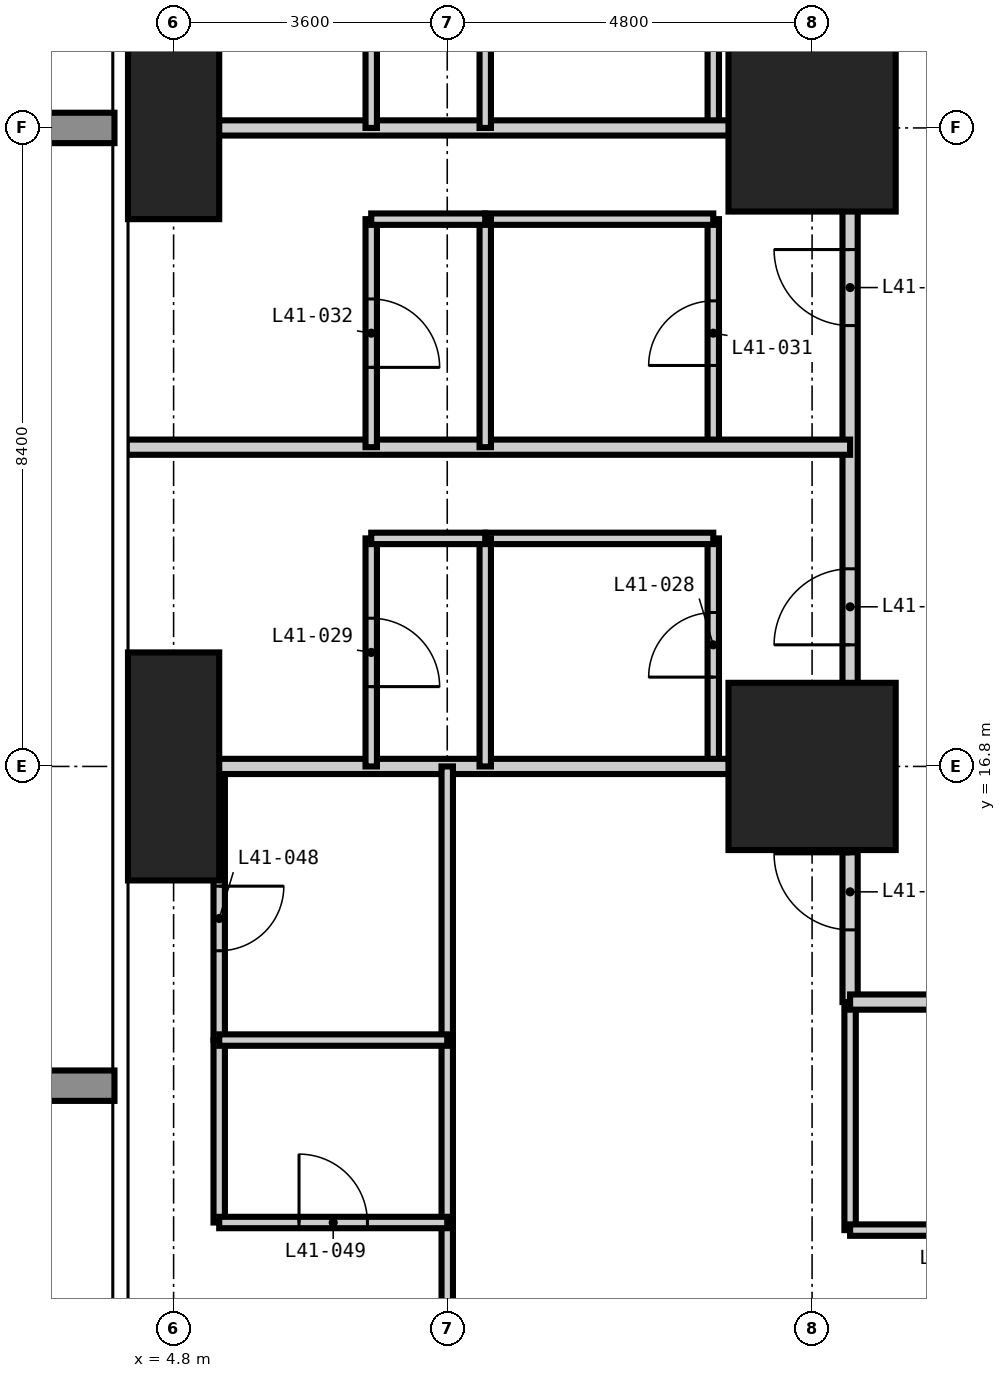
"""IFC4 building model, lengths in metres.
Left out: names, types, materials, properties, quantities, classifications, styles, units other than length and angle.
Written with IfcOpenShell. Run it as: python <this file> out.ifc"""

import sys

from ifc_helpers import new_model, si_unit, direction, frame, frame_2d, origin, origin_2d, place, context, subcontext, project, spatial, rectangle, extrude, element, fill, save


model = new_model("IFC4")
c1 = context("Model", 3, precision=1e-05, world=origin(), true_north=direction((0.0, 1.0)))
c2 = subcontext(c1, "Body", "Model", "MODEL_VIEW")
j1 = project(units=[si_unit("LENGTHUNIT", "METRE"), si_unit("PLANEANGLEUNIT", "RADIAN")], contexts=[c1])
p1 = place(None, origin())
s1 = spatial("IfcSite", under=j1, at=p1, CompositionType="ELEMENT")
p2 = place(p1, origin())
s2 = spatial("IfcBuilding", under=s1, at=p2, CompositionType="ELEMENT")
p3 = place(p2, frame((0.0, 0.0, 162.6)))
s3 = spatial("IfcBuildingStorey", under=s2, at=p3, CompositionType="ELEMENT", Elevation=162.6)
p4 = place(p3, frame((4.8, 16.8, -0.35), z_axis=(0.0, 0.0, 1.0), x_axis=(1.0, 0.0, 0.0)))
e1 = element("IfcColumn", 1, at=p4, inside=s3, PredefinedType="COLUMN", context=c2, shape_type="SweptSolid", body=[
    extrude(rectangle(XDim=1.2, YDim=3.0, at=origin_2d()), origin(), (0.0, 0.0, 1.0), 3.6),
])
p5 = place(p3, frame((4.8, 25.2, -0.35), z_axis=(0.0, 0.0, 1.0), x_axis=(1.0, 0.0, 0.0)))
e2 = element("IfcColumn", 2, at=p5, inside=s3, PredefinedType="COLUMN", context=c2, shape_type="SweptSolid", body=[
    extrude(rectangle(XDim=1.2, YDim=2.4, at=origin_2d()), origin(), (0.0, 0.0, 1.0), 3.6),
])
for number, where, z_axis, x_axis in (
    (3, (13.2, 16.8, -0.35), (0.0, 0.0, 1.0), (1.0, 0.0, 0.0)),
    (4, (13.2, 25.2, -0.35), (0.0, 0.0, 1.0), (1.0, 0.0, 0.0)),
):
    element("IfcColumn", number, at=place(p3, frame(where, z_axis=z_axis, x_axis=x_axis)), inside=s3, PredefinedType="COLUMN", context=c2, shape_type="SweptSolid", body=[
        extrude(rectangle(XDim=2.2, YDim=2.2, at=origin_2d()), origin(), (0.0, 0.0, 1.0), 3.6),
    ])
p6 = place(p3, frame((5.4, 13.2, 0.0), z_axis=(0.0, 0.0, 1.0), x_axis=(0.0, 1.0, 0.0)))
e5 = element("IfcWall", 5, at=p6, inside=s3, PredefinedType="PARTITIONING", context=c2, shape_type="SweptSolid", body=[
    extrude(rectangle(XDim=3.6, YDim=0.15, at=frame_2d((1.8, 0.0))), origin(), (0.0, 0.0, 1.0), 3.25),
])
p7 = place(p6, frame((1.175, 0.0, 0.0)))
e6 = element("IfcOpeningElement", 6, at=p7, cuts=e5, PredefinedType="OPENING", context=c2, shape_type="SweptSolid", body=[
    extrude(rectangle(XDim=0.85, YDim=2.1, at=frame_2d((0.425, 1.05))), frame((0.0, 0.085, 0.0), z_axis=(0.0, -1.0, 0.0), x_axis=(1.0, 0.0, 0.0)), (0.0, 0.0, 1.0), 0.17),
])
p8 = place(p3, frame((11.9, 16.8, 0.0), z_axis=(0.0, 0.0, 1.0), x_axis=(0.0, 1.0, 0.0)))
e7 = element("IfcWall", 7, at=p8, inside=s3, PredefinedType="PARTITIONING", context=c2, shape_type="SweptSolid", body=[
    extrude(rectangle(XDim=3.0, YDim=0.15, at=frame_2d((1.5, 0.0))), origin(), (0.0, 0.0, 1.0), 3.25),
])
p9 = place(p8, frame((1.175, 0.0, 0.0)))
e8 = element("IfcOpeningElement", 8, at=p9, cuts=e7, PredefinedType="OPENING", context=c2, shape_type="SweptSolid", body=[
    extrude(rectangle(XDim=0.85, YDim=2.1, at=frame_2d((0.425, 1.05))), frame((0.0, 0.085, 0.0), z_axis=(0.0, -1.0, 0.0), x_axis=(1.0, 0.0, 0.0)), (0.0, 0.0, 1.0), 0.17),
])
p10 = place(p3, frame((11.9, 21.0, 0.0), z_axis=(0.0, 0.0, 1.0), x_axis=(0.0, 1.0, 0.0)))
e9 = element("IfcWall", 9, at=p10, inside=s3, PredefinedType="PARTITIONING", context=c2, shape_type="SweptSolid", body=[
    extrude(rectangle(XDim=3.0, YDim=0.15, at=frame_2d((1.5, 0.0))), origin(), (0.0, 0.0, 1.0), 3.25),
])
p11 = place(p10, frame((1.075, 0.0, 0.0)))
e10 = element("IfcOpeningElement", 10, at=p11, cuts=e9, PredefinedType="OPENING", context=c2, shape_type="SweptSolid", body=[
    extrude(rectangle(XDim=0.85, YDim=2.1, at=frame_2d((0.425, 1.05))), frame((0.0, 0.085, 0.0), z_axis=(0.0, -1.0, 0.0), x_axis=(1.0, 0.0, 0.0)), (0.0, 0.0, 1.0), 0.17),
])
p12 = place(p3, frame((11.9, 25.2, 0.0), z_axis=(0.0, 0.0, 1.0), x_axis=(0.0, 1.0, 0.0)))
e11 = element("IfcWall", 11, at=p12, inside=s3, PredefinedType="PARTITIONING", context=c2, shape_type="SweptSolid", body=[
    extrude(rectangle(XDim=3.0, YDim=0.15, at=frame_2d((1.5, 0.0))), origin(), (0.0, 0.0, 1.0), 3.25),
])
p13 = place(p12, frame((1.175, 0.0, 0.0)))
e12 = element("IfcOpeningElement", 12, at=p13, cuts=e11, PredefinedType="OPENING", context=c2, shape_type="SweptSolid", body=[
    extrude(rectangle(XDim=0.85, YDim=2.1, at=frame_2d((0.425, 1.05))), frame((0.0, 0.085, 0.0), z_axis=(0.0, -1.0, 0.0), x_axis=(1.0, 0.0, 0.0)), (0.0, 0.0, 1.0), 0.17),
])
p14 = place(p3, frame((13.7, 10.7, 0.0), z_axis=(0.0, 0.0, 1.0), x_axis=(0.0, 1.0, 0.0)))
e13 = element("IfcWall", 13, at=p14, inside=s3, PredefinedType="PARTITIONING", context=c2, shape_type="SweptSolid", body=[
    extrude(rectangle(XDim=3.0, YDim=0.15, at=frame_2d((1.5, 0.0))), origin(), (0.0, 0.0, 1.0), 3.25),
])
p15 = place(p3, frame((13.7, 10.7, 0.0), z_axis=(0.0, 0.0, 1.0), x_axis=(1.0, 0.0, 0.0)))
e14 = element("IfcWall", 14, at=p15, inside=s3, PredefinedType="PARTITIONING", context=c2, shape_type="SweptSolid", body=[
    extrude(rectangle(XDim=3.1, YDim=0.15, at=frame_2d((1.55, 0.0))), origin(), (0.0, 0.0, 1.0), 3.25),
])
p16 = place(p15, frame((1.125, 0.0, 0.0)))
e15 = element("IfcOpeningElement", 15, at=p16, cuts=e14, PredefinedType="OPENING", context=c2, shape_type="SweptSolid", body=[
    extrude(rectangle(XDim=0.85, YDim=2.1, at=frame_2d((0.425, 1.05))), frame((0.0, 0.085, 0.0), z_axis=(0.0, -1.0, 0.0), x_axis=(1.0, 0.0, 0.0)), (0.0, 0.0, 1.0), 0.17),
])
for number, where, z_axis, x_axis in (
    (16, (8.9, 19.8, 0.0), (0.0, 0.0, 1.0), (1.0, 0.0, 0.0)),
    (17, (8.9, 24.0, 0.0), (0.0, 0.0, 1.0), (1.0, 0.0, 0.0)),
):
    element("IfcWall", number, at=place(p3, frame(where, z_axis=z_axis, x_axis=x_axis)), inside=s3, PredefinedType="PARTITIONING", context=c2, shape_type="SweptSolid", body=[
        extrude(rectangle(XDim=3.0, YDim=0.15, at=frame_2d((1.5, 0.0))), origin(), (0.0, 0.0, 1.0), 3.25),
    ])
p17 = place(p3, frame((13.7, 13.7, 0.0), z_axis=(0.0, 0.0, 1.0), x_axis=(0.0, 1.0, 0.0)))
e18 = element("IfcWall", 18, at=p17, inside=s3, PredefinedType="PARTITIONING", context=c2, shape_type="SweptSolid", body=[
    extrude(rectangle(XDim=30.8, YDim=0.2, at=frame_2d((15.4, 0.0))), origin(), (0.0, 0.0, 1.0), 3.25),
])
p18 = place(p17, frame((4.7, 0.0, 0.0)))
e19 = element("IfcOpeningElement", 19, at=p18, cuts=e18, PredefinedType="OPENING", context=c2, shape_type="SweptSolid", body=[
    extrude(rectangle(XDim=1.0, YDim=2.2, at=frame_2d((0.5, 1.1))), frame((0.0, 0.11, 0.0), z_axis=(0.0, -1.0, 0.0), x_axis=(1.0, 0.0, 0.0)), (0.0, 0.0, 1.0), 0.22),
])
p19 = place(p17, frame((8.9, 0.0, 0.0)))
e20 = element("IfcOpeningElement", 20, at=p19, cuts=e18, PredefinedType="OPENING", context=c2, shape_type="SweptSolid", body=[
    extrude(rectangle(XDim=1.0, YDim=2.2, at=frame_2d((0.5, 1.1))), frame((0.0, 0.11, 0.0), z_axis=(0.0, -1.0, 0.0), x_axis=(1.0, 0.0, 0.0)), (0.0, 0.0, 1.0), 0.22),
])
p20 = place(p17, frame((13.1, 0.0, 0.0)))
e21 = element("IfcOpeningElement", 21, at=p20, cuts=e18, PredefinedType="OPENING", context=c2, shape_type="SweptSolid", body=[
    extrude(rectangle(XDim=1.0, YDim=2.2, at=frame_2d((0.5, 1.1))), frame((0.0, 0.11, 0.0), z_axis=(0.0, -1.0, 0.0), x_axis=(1.0, 0.0, 0.0)), (0.0, 0.0, 1.0), 0.22),
])
p21 = place(p17, frame((17.3, 0.0, 0.0)))
e22 = element("IfcOpeningElement", 22, at=p21, cuts=e18, PredefinedType="OPENING", context=c2, shape_type="SweptSolid", body=[
    extrude(rectangle(XDim=1.0, YDim=2.2, at=frame_2d((0.5, 1.1))), frame((0.0, 0.11, 0.0), z_axis=(0.0, -1.0, 0.0), x_axis=(1.0, 0.0, 0.0)), (0.0, 0.0, 1.0), 0.22),
])
p22 = place(p17, frame((21.5, 0.0, 0.0)))
e23 = element("IfcOpeningElement", 23, at=p22, cuts=e18, PredefinedType="OPENING", context=c2, shape_type="SweptSolid", body=[
    extrude(rectangle(XDim=1.0, YDim=2.2, at=frame_2d((0.5, 1.1))), frame((0.0, 0.11, 0.0), z_axis=(0.0, -1.0, 0.0), x_axis=(1.0, 0.0, 0.0)), (0.0, 0.0, 1.0), 0.22),
])
p23 = place(p17, frame((25.7, 0.0, 0.0)))
e24 = element("IfcOpeningElement", 24, at=p23, cuts=e18, PredefinedType="OPENING", context=c2, shape_type="SweptSolid", body=[
    extrude(rectangle(XDim=1.0, YDim=2.2, at=frame_2d((0.5, 1.1))), frame((0.0, 0.11, 0.0), z_axis=(0.0, -1.0, 0.0), x_axis=(1.0, 0.0, 0.0)), (0.0, 0.0, 1.0), 0.22),
])
p24 = place(p17, frame((0.95, 0.0, 0.0)))
e25 = element("IfcOpeningElement", 25, at=p24, cuts=e18, PredefinedType="OPENING", context=c2, shape_type="SweptSolid", body=[
    extrude(rectangle(XDim=1.0, YDim=2.2, at=frame_2d((0.5, 1.1))), frame((0.0, 0.11, 0.0), z_axis=(0.0, -1.0, 0.0), x_axis=(1.0, 0.0, 0.0)), (0.0, 0.0, 1.0), 0.22),
])
p25 = place(p17, frame((29.45, 0.0, 0.0)))
e26 = element("IfcOpeningElement", 26, at=p25, cuts=e18, PredefinedType="OPENING", context=c2, shape_type="SweptSolid", body=[
    extrude(rectangle(XDim=1.0, YDim=2.2, at=frame_2d((0.5, 1.1))), frame((0.0, 0.11, 0.0), z_axis=(0.0, -1.0, 0.0), x_axis=(1.0, 0.0, 0.0)), (0.0, 0.0, 1.0), 0.22),
])
p26 = place(p3, frame((45.7, 13.7, 0.0), z_axis=(0.0, 0.0, 1.0), x_axis=(-1.0, 0.0, 0.0)))
e27 = element("IfcWall", 27, at=p26, inside=s3, PredefinedType="PARTITIONING", context=c2, shape_type="SweptSolid", body=[
    extrude(rectangle(XDim=32.0, YDim=0.2, at=frame_2d((16.0, 0.0))), origin(), (0.0, 0.0, 1.0), 3.25),
])
p27 = place(p26, frame((24.2, 0.0, 0.0)))
e28 = element("IfcOpeningElement", 28, at=p27, cuts=e27, PredefinedType="OPENING", context=c2, shape_type="SweptSolid", body=[
    extrude(rectangle(XDim=1.0, YDim=2.2, at=frame_2d((0.5, 1.1))), frame((0.0, 0.11, 0.0), z_axis=(0.0, -1.0, 0.0), x_axis=(1.0, 0.0, 0.0)), (0.0, 0.0, 1.0), 0.22),
])
p28 = place(p26, frame((15.8, 0.0, 0.0)))
e29 = element("IfcOpeningElement", 29, at=p28, cuts=e27, PredefinedType="OPENING", context=c2, shape_type="SweptSolid", body=[
    extrude(rectangle(XDim=1.0, YDim=2.2, at=frame_2d((0.5, 1.1))), frame((0.0, 0.11, 0.0), z_axis=(0.0, -1.0, 0.0), x_axis=(1.0, 0.0, 0.0)), (0.0, 0.0, 1.0), 0.22),
])
p29 = place(p26, frame((7.4, 0.0, 0.0)))
e30 = element("IfcOpeningElement", 30, at=p29, cuts=e27, PredefinedType="OPENING", context=c2, shape_type="SweptSolid", body=[
    extrude(rectangle(XDim=1.0, YDim=2.2, at=frame_2d((0.5, 1.1))), frame((0.0, 0.11, 0.0), z_axis=(0.0, -1.0, 0.0), x_axis=(1.0, 0.0, 0.0)), (0.0, 0.0, 1.0), 0.22),
])
for number, where, z_axis, x_axis in (
    (31, (4.182, 16.8, 0.0), (0.0, 0.0, 1.0), (1.0, 0.0, 0.0)),
    (32, (4.182, 21.0, 0.0), (0.0, 0.0, 1.0), (1.0, 0.0, 0.0)),
    (33, (4.182, 25.2, 0.0), (0.0, 0.0, 1.0), (1.0, 0.0, 0.0)),
):
    element("IfcWall", number, at=place(p3, frame(where, z_axis=z_axis, x_axis=x_axis)), inside=s3, PredefinedType="PARTITIONING", context=c2, shape_type="SweptSolid", body=[
        extrude(rectangle(XDim=9.518, YDim=0.2, at=frame_2d((4.759, 0.0))), origin(), (0.0, 0.0, 1.0), 3.25),
    ])
p30 = place(p3, frame((5.4, 10.8, 0.0), z_axis=(0.0, 0.0, 1.0), x_axis=(0.0, 1.0, 0.0)))
e34 = element("IfcWall", 34, at=p30, inside=s3, PredefinedType="PARTITIONING", context=c2, shape_type="SweptSolid", body=[
    extrude(rectangle(XDim=2.4, YDim=0.15, at=frame_2d((1.2, 0.0))), origin(), (0.0, 0.0, 1.0), 3.25),
])
p31 = place(p3, frame((7.4, 16.8, 0.0), z_axis=(0.0, 0.0, 1.0), x_axis=(0.0, 1.0, 0.0)))
e35 = element("IfcWall", 35, at=p31, inside=s3, PredefinedType="PARTITIONING", context=c2, shape_type="SweptSolid", body=[
    extrude(rectangle(XDim=3.0, YDim=0.15, at=frame_2d((1.5, 0.0))), origin(), (0.0, 0.0, 1.0), 3.25),
])
p32 = place(p31, frame((1.05, 0.0, 0.0)))
e36 = element("IfcOpeningElement", 36, at=p32, cuts=e35, PredefinedType="OPENING", context=c2, shape_type="SweptSolid", body=[
    extrude(rectangle(XDim=0.9, YDim=2.1, at=frame_2d((0.45, 1.05))), frame((0.0, 0.085, 0.0), z_axis=(0.0, -1.0, 0.0), x_axis=(1.0, 0.0, 0.0)), (0.0, 0.0, 1.0), 0.17),
])
p33 = place(p3, frame((7.4, 21.0, 0.0), z_axis=(0.0, 0.0, 1.0), x_axis=(0.0, 1.0, 0.0)))
e37 = element("IfcWall", 37, at=p33, inside=s3, PredefinedType="PARTITIONING", context=c2, shape_type="SweptSolid", body=[
    extrude(rectangle(XDim=3.0, YDim=0.15, at=frame_2d((1.5, 0.0))), origin(), (0.0, 0.0, 1.0), 3.25),
])
p34 = place(p33, frame((1.05, 0.0, 0.0)))
e38 = element("IfcOpeningElement", 38, at=p34, cuts=e37, PredefinedType="OPENING", context=c2, shape_type="SweptSolid", body=[
    extrude(rectangle(XDim=0.9, YDim=2.1, at=frame_2d((0.45, 1.05))), frame((0.0, 0.085, 0.0), z_axis=(0.0, -1.0, 0.0), x_axis=(1.0, 0.0, 0.0)), (0.0, 0.0, 1.0), 0.17),
])
p35 = place(p3, frame((7.4, 25.2, 0.0), z_axis=(0.0, 0.0, 1.0), x_axis=(0.0, 1.0, 0.0)))
e39 = element("IfcWall", 39, at=p35, inside=s3, PredefinedType="PARTITIONING", context=c2, shape_type="SweptSolid", body=[
    extrude(rectangle(XDim=3.0, YDim=0.15, at=frame_2d((1.5, 0.0))), origin(), (0.0, 0.0, 1.0), 3.25),
])
p36 = place(p35, frame((1.05, 0.0, 0.0)))
e40 = element("IfcOpeningElement", 40, at=p36, cuts=e39, PredefinedType="OPENING", context=c2, shape_type="SweptSolid", body=[
    extrude(rectangle(XDim=0.9, YDim=2.1, at=frame_2d((0.45, 1.05))), frame((0.0, 0.085, 0.0), z_axis=(0.0, -1.0, 0.0), x_axis=(1.0, 0.0, 0.0)), (0.0, 0.0, 1.0), 0.17),
])
p37 = place(p3, frame((8.4, 4.182, 0.0), z_axis=(0.0, 0.0, 1.0), x_axis=(0.0, 1.0, 0.0)))
e41 = element("IfcWall", 41, at=p37, inside=s3, PredefinedType="PARTITIONING", context=c2, shape_type="SweptSolid", body=[
    extrude(rectangle(XDim=12.618, YDim=0.15, at=frame_2d((6.309, 0.0))), origin(), (0.0, 0.0, 1.0), 3.25),
])
p38 = place(p37, frame((2.868, 0.0, 0.0)))
e42 = element("IfcOpeningElement", 42, at=p38, cuts=e41, PredefinedType="OPENING", context=c2, shape_type="SweptSolid", body=[
    extrude(rectangle(XDim=0.9, YDim=2.1, at=frame_2d((0.45, 1.05))), frame((0.0, 0.085, 0.0), z_axis=(0.0, -1.0, 0.0), x_axis=(1.0, 0.0, 0.0)), (0.0, 0.0, 1.0), 0.17),
])
for number, where, z_axis, x_axis in (
    (43, (8.9, 16.8, 0.0), (0.0, 0.0, 1.0), (0.0, 1.0, 0.0)),
    (44, (8.9, 21.0, 0.0), (0.0, 0.0, 1.0), (0.0, 1.0, 0.0)),
    (45, (8.9, 25.2, 0.0), (0.0, 0.0, 1.0), (0.0, 1.0, 0.0)),
):
    element("IfcWall", number, at=place(p3, frame(where, z_axis=z_axis, x_axis=x_axis)), inside=s3, PredefinedType="PARTITIONING", context=c2, shape_type="SweptSolid", body=[
        extrude(rectangle(XDim=3.0, YDim=0.15, at=frame_2d((1.5, 0.0))), origin(), (0.0, 0.0, 1.0), 3.25),
    ])
p39 = place(p3, frame((5.4, 10.8, 0.0), z_axis=(0.0, 0.0, 1.0), x_axis=(1.0, 0.0, 0.0)))
e46 = element("IfcWall", 46, at=p39, inside=s3, PredefinedType="PARTITIONING", context=c2, shape_type="SweptSolid", body=[
    extrude(rectangle(XDim=3.0, YDim=0.15, at=frame_2d((1.5, 0.0))), origin(), (0.0, 0.0, 1.0), 3.25),
])
p40 = place(p39, frame((1.05, 0.0, 0.0)))
e47 = element("IfcOpeningElement", 47, at=p40, cuts=e46, PredefinedType="OPENING", context=c2, shape_type="SweptSolid", body=[
    extrude(rectangle(XDim=0.9, YDim=2.1, at=frame_2d((0.45, 1.05))), frame((0.0, 0.085, 0.0), z_axis=(0.0, -1.0, 0.0), x_axis=(1.0, 0.0, 0.0)), (0.0, 0.0, 1.0), 0.17),
])
p41 = place(p3, frame((5.4, 13.2, 0.0), z_axis=(0.0, 0.0, 1.0), x_axis=(1.0, 0.0, 0.0)))
e48 = element("IfcWall", 48, at=p41, inside=s3, PredefinedType="PARTITIONING", context=c2, shape_type="SweptSolid", body=[
    extrude(rectangle(XDim=3.0, YDim=0.15, at=frame_2d((1.5, 0.0))), origin(), (0.0, 0.0, 1.0), 3.25),
])
for number, where, z_axis, x_axis in (
    (49, (7.4, 19.8, 0.0), (0.0, 0.0, 1.0), (1.0, 0.0, 0.0)),
    (50, (7.4, 24.0, 0.0), (0.0, 0.0, 1.0), (1.0, 0.0, 0.0)),
):
    element("IfcWall", number, at=place(p3, frame(where, z_axis=z_axis, x_axis=x_axis)), inside=s3, PredefinedType="PARTITIONING", context=c2, shape_type="SweptSolid", body=[
        extrude(rectangle(XDim=1.5, YDim=0.15, at=frame_2d((0.75, 0.0))), origin(), (0.0, 0.0, 1.0), 3.25),
    ])
p42 = place(p18, origin())
e51 = element("IfcDoor", 51, at=p42, inside=s3, OperationType="SINGLE_SWING_LEFT", PredefinedType="DOOR", context=c2, shape_type="SweptSolid", body=[
    extrude(rectangle(XDim=1.0, YDim=2.2, at=frame_2d((0.5, 1.1))), frame((0.0, 0.025, 0.0), z_axis=(0.0, -1.0, 0.0), x_axis=(1.0, 0.0, 0.0)), (0.0, 0.0, 1.0), 0.05),
])
fill(e19, e51)
p43 = place(p9, origin())
e52 = element("IfcDoor", 52, at=p43, inside=s3, OperationType="SINGLE_SWING_LEFT", PredefinedType="DOOR", context=c2, shape_type="SweptSolid", body=[
    extrude(rectangle(XDim=0.85, YDim=2.1, at=frame_2d((0.425, 1.05))), frame((0.0, 0.025, 0.0), z_axis=(0.0, -1.0, 0.0), x_axis=(1.0, 0.0, 0.0)), (0.0, 0.0, 1.0), 0.05),
])
fill(e8, e52)
p44 = place(p32, frame((0.9, 0.0, 0.0), z_axis=(0.0, 0.0, 1.0), x_axis=(-1.0, 0.0, 0.0)))
e53 = element("IfcDoor", 53, at=p44, inside=s3, OperationType="SINGLE_SWING_RIGHT", PredefinedType="DOOR", context=c2, shape_type="SweptSolid", body=[
    extrude(rectangle(XDim=0.9, YDim=2.1, at=frame_2d((0.45, 1.05))), frame((0.0, 0.025, 0.0), z_axis=(0.0, -1.0, 0.0), x_axis=(1.0, 0.0, 0.0)), (0.0, 0.0, 1.0), 0.05),
])
fill(e36, e53)
p45 = place(p19, origin())
e54 = element("IfcDoor", 54, at=p45, inside=s3, OperationType="SINGLE_SWING_RIGHT", PredefinedType="DOOR", context=c2, shape_type="SweptSolid", body=[
    extrude(rectangle(XDim=1.0, YDim=2.2, at=frame_2d((0.5, 1.1))), frame((0.0, 0.025, 0.0), z_axis=(0.0, -1.0, 0.0), x_axis=(1.0, 0.0, 0.0)), (0.0, 0.0, 1.0), 0.05),
])
fill(e20, e54)
p46 = place(p11, origin())
e55 = element("IfcDoor", 55, at=p46, inside=s3, OperationType="SINGLE_SWING_LEFT", PredefinedType="DOOR", context=c2, shape_type="SweptSolid", body=[
    extrude(rectangle(XDim=0.85, YDim=2.1, at=frame_2d((0.425, 1.05))), frame((0.0, 0.025, 0.0), z_axis=(0.0, -1.0, 0.0), x_axis=(1.0, 0.0, 0.0)), (0.0, 0.0, 1.0), 0.05),
])
fill(e10, e55)
p47 = place(p34, frame((0.9, 0.0, 0.0), z_axis=(0.0, 0.0, 1.0), x_axis=(-1.0, 0.0, 0.0)))
e56 = element("IfcDoor", 56, at=p47, inside=s3, OperationType="SINGLE_SWING_RIGHT", PredefinedType="DOOR", context=c2, shape_type="SweptSolid", body=[
    extrude(rectangle(XDim=0.9, YDim=2.1, at=frame_2d((0.45, 1.05))), frame((0.0, 0.025, 0.0), z_axis=(0.0, -1.0, 0.0), x_axis=(1.0, 0.0, 0.0)), (0.0, 0.0, 1.0), 0.05),
])
fill(e38, e56)
p48 = place(p24, origin())
e57 = element("IfcDoor", 57, at=p48, inside=s3, OperationType="SINGLE_SWING_RIGHT", PredefinedType="DOOR", context=c2, shape_type="SweptSolid", body=[
    extrude(rectangle(XDim=1.0, YDim=2.2, at=frame_2d((0.5, 1.1))), frame((0.0, 0.025, 0.0), z_axis=(0.0, -1.0, 0.0), x_axis=(1.0, 0.0, 0.0)), (0.0, 0.0, 1.0), 0.05),
])
fill(e25, e57)
p49 = place(p7, frame((0.85, 0.0, 0.0), z_axis=(0.0, 0.0, 1.0), x_axis=(-1.0, 0.0, 0.0)))
e58 = element("IfcDoor", 58, at=p49, inside=s3, OperationType="SINGLE_SWING_LEFT", PredefinedType="DOOR", context=c2, shape_type="SweptSolid", body=[
    extrude(rectangle(XDim=0.85, YDim=2.1, at=frame_2d((0.425, 1.05))), frame((0.0, 0.025, 0.0), z_axis=(0.0, -1.0, 0.0), x_axis=(1.0, 0.0, 0.0)), (0.0, 0.0, 1.0), 0.05),
])
fill(e6, e58)
p50 = place(p40, origin())
e59 = element("IfcDoor", 59, at=p50, inside=s3, OperationType="SINGLE_SWING_LEFT", PredefinedType="DOOR", context=c2, shape_type="SweptSolid", body=[
    extrude(rectangle(XDim=0.9, YDim=2.1, at=frame_2d((0.45, 1.05))), frame((0.0, 0.025, 0.0), z_axis=(0.0, -1.0, 0.0), x_axis=(1.0, 0.0, 0.0)), (0.0, 0.0, 1.0), 0.05),
])
fill(e47, e59)
save(model, sys.argv[1])
